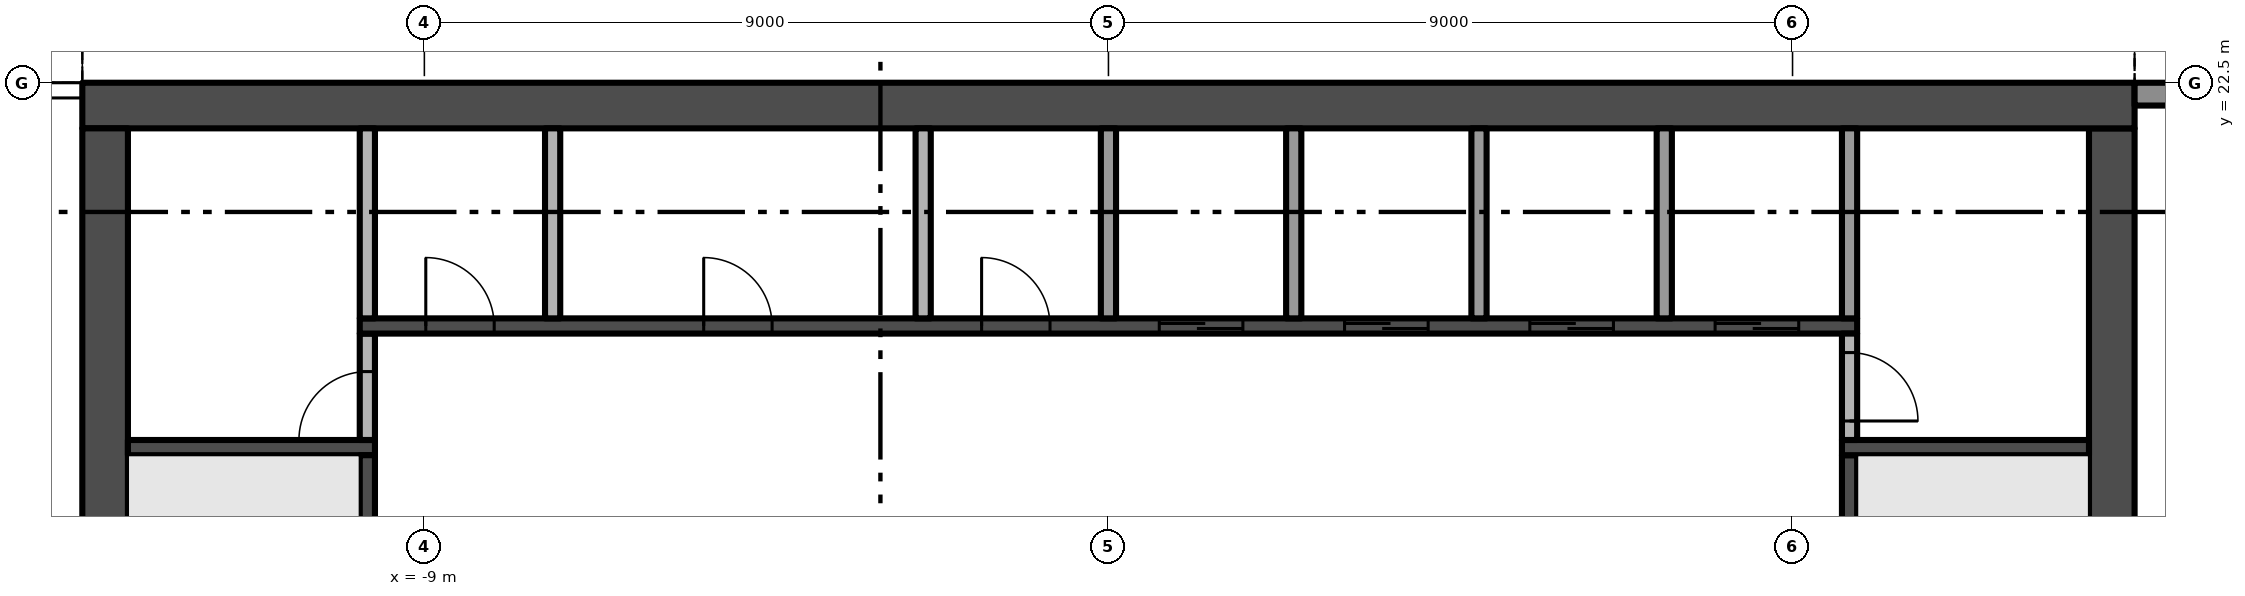
"""IFC4 building model, lengths in metres.
Left out: names, types, materials, properties, quantities, classifications, styles, units other than length and angle.
Written with IfcOpenShell. Run it as: python <this file> out.ifc"""

import sys

from ifc_helpers import new_model, si_unit, direction, frame, frame_2d, origin, place, context, subcontext, project, spatial, polyline, rectangle, outline, extrude, element, fill, save


model = new_model("IFC4")
c1 = context("Model", 3, precision=1e-05, world=origin(), true_north=direction((0.0, 1.0)))
c2 = subcontext(c1, "Body", "Model", "MODEL_VIEW")
j1 = project(units=[si_unit("LENGTHUNIT", "METRE"), si_unit("PLANEANGLEUNIT", "RADIAN")], contexts=[c1])
p1 = place(None, origin())
s1 = spatial("IfcSite", under=j1, at=p1, CompositionType="ELEMENT")
p2 = place(p1, origin())
s2 = spatial("IfcBuilding", under=s1, at=p2, CompositionType="ELEMENT")
p3 = place(p2, frame((0.0, 0.0, 233.8)))
s3 = spatial("IfcBuildingStorey", under=s2, at=p3, CompositionType="ELEMENT", Elevation=233.8)
p4 = place(p3, frame((13.2, 5.1, -0.3), z_axis=(0.0, 0.0, 1.0), x_axis=(0.0, 1.0, 0.0)))
e1 = element("IfcWall", 1, at=p4, inside=s3, PredefinedType="SHEAR", context=c2, shape_type="SweptSolid", body=[
    extrude(rectangle(XDim=16.8, YDim=0.6, at=frame_2d((8.4, 0.0))), origin(), (0.0, 0.0, 1.0), 5.0),
])
p5 = place(p4, frame((6.3, 0.0, 0.3)))
e2 = element("IfcOpeningElement", 2, at=p5, cuts=e1, PredefinedType="OPENING", context=c2, shape_type="SweptSolid", body=[
    extrude(rectangle(XDim=1.2, YDim=2.2, at=frame_2d((0.6, 1.1))), frame((0.0, 0.31, 0.0), z_axis=(0.0, -1.0, 0.0), x_axis=(1.0, 0.0, 0.0)), (0.0, 0.0, 1.0), 0.62),
])
p6 = place(p3, frame((13.5, 22.2, -0.3), z_axis=(0.0, 0.0, 1.0), x_axis=(-1.0, 0.0, 0.0)))
e3 = element("IfcWall", 3, at=p6, inside=s3, PredefinedType="SHEAR", context=c2, shape_type="SweptSolid", body=[
    extrude(rectangle(XDim=27.0, YDim=0.6, at=frame_2d((13.5, 0.0))), origin(), (0.0, 0.0, 1.0), 5.0),
])
p7 = place(p3, frame((-13.2, 21.9, -0.3), z_axis=(0.0, 0.0, 1.0), x_axis=(0.0, -1.0, 0.0)))
e4 = element("IfcWall", 4, at=p7, inside=s3, PredefinedType="SHEAR", context=c2, shape_type="SweptSolid", body=[
    extrude(rectangle(XDim=16.8, YDim=0.6, at=frame_2d((8.4, 0.0))), origin(), (0.0, 0.0, 1.0), 5.0),
])
p8 = place(p7, frame((9.3, 0.0, 0.3)))
e5 = element("IfcOpeningElement", 5, at=p8, cuts=e4, PredefinedType="OPENING", context=c2, shape_type="SweptSolid", body=[
    extrude(rectangle(XDim=1.2, YDim=2.2, at=frame_2d((0.6, 1.1))), frame((0.0, 0.31, 0.0), z_axis=(0.0, -1.0, 0.0), x_axis=(1.0, 0.0, 0.0)), (0.0, 0.0, 1.0), 0.62),
])
p9 = place(p3, frame((13.5, 22.35, 0.0), z_axis=(0.0, 0.0, 1.0), x_axis=(1.0, 0.0, 0.0)))
e6 = element("IfcWall", 6, at=p9, inside=s3, PredefinedType="SOLIDWALL", context=c2, shape_type="SweptSolid", body=[
    extrude(rectangle(XDim=4.025, YDim=0.3, at=frame_2d((2.013, 0.0))), origin(), (0.0, 0.0, 1.0), 4.7),
])
p10 = place(p9, frame((0.575, 0.0, 0.0)))
e7 = element("IfcOpeningElement", 7, at=p10, cuts=e6, PredefinedType="OPENING", context=c2, shape_type="SweptSolid", body=[
    extrude(rectangle(XDim=3.125, YDim=2.4, at=frame_2d((1.562, 1.2))), frame((0.0, 0.16, 0.0), z_axis=(0.0, -1.0, 0.0), x_axis=(1.0, 0.0, 0.0)), (0.0, 0.0, 1.0), 0.32),
])
p11 = place(p3, origin())
e8 = element("IfcWall", 8, at=p11, inside=s3, PredefinedType="USERDEFINED", context=c2, shape_type="SweptSolid", body=[
    extrude(outline(polyline([(22.5, 23.1), (21.0, 23.329), (19.5, 23.929), (18.0, 24.671), (16.5, 25.271), (15.0, 25.5), (13.5, 25.271), (13.538, 25.024), (15.0, 25.247), (16.434, 25.028), (17.898, 24.442), (19.398, 23.701), (20.934, 23.086), (22.462, 22.853), (22.5, 23.1)])), origin(), (0.0, 0.0, 1.0), 0.9),
])
p12 = place(p3, origin())
e9 = element("IfcWall", 9, at=p12, inside=s3, PredefinedType="USERDEFINED", context=c2, shape_type="SweptSolid", body=[
    extrude(outline(polyline([(-13.5, 23.1), (-15.0, 23.329), (-16.5, 23.929), (-18.0, 24.671), (-19.5, 25.271), (-21.0, 25.5), (-22.5, 25.271), (-22.462, 25.024), (-21.0, 25.247), (-19.566, 25.028), (-18.102, 24.442), (-16.602, 23.701), (-15.066, 23.086), (-13.538, 22.853), (-13.5, 23.1)])), origin(), (0.0, 0.0, 1.0), 0.9),
])
p13 = place(p3, frame((-12.9, 17.7, 0.0), z_axis=(0.0, 0.0, 1.0), x_axis=(1.0, 0.0, 0.0)))
e10 = element("IfcWall", 10, at=p13, inside=s3, PredefinedType="SHEAR", context=c2, shape_type="SweptSolid", body=[
    extrude(rectangle(XDim=3.25, YDim=0.2, at=frame_2d((1.625, 0.0))), origin(), (0.0, 0.0, 1.0), 4.7),
])
p14 = place(p3, frame((-9.75, 16.1, 0.0), z_axis=(0.0, 0.0, 1.0), x_axis=(0.0, 1.0, 0.0)))
e11 = element("IfcWall", 11, at=p14, inside=s3, PredefinedType="SHEAR", context=c2, shape_type="SweptSolid", body=[
    extrude(rectangle(XDim=1.5, YDim=0.2, at=frame_2d((0.75, 0.0))), origin(), (0.0, 0.0, 1.0), 4.7),
])
p15 = place(p3, frame((-9.75, 17.8, 0.0), z_axis=(0.0, 0.0, 1.0), x_axis=(0.0, 1.0, 0.0)))
e12 = element("IfcWall", 12, at=p15, inside=s3, PredefinedType="PARTITIONING", context=c2, shape_type="SweptSolid", body=[
    extrude(rectangle(XDim=1.4, YDim=0.2, at=frame_2d((0.7, 0.0))), origin(), (0.0, 0.0, 1.0), 4.7),
])
p16 = place(p15, origin())
e13 = element("IfcOpeningElement", 13, at=p16, cuts=e12, PredefinedType="OPENING", context=c2, shape_type="SweptSolid", body=[
    extrude(rectangle(XDim=0.9, YDim=2.1, at=frame_2d((0.45, 1.05))), frame((0.0, 0.11, 0.0), z_axis=(0.0, -1.0, 0.0), x_axis=(1.0, 0.0, 0.0)), (0.0, 0.0, 1.0), 0.22),
])
p17 = place(p3, frame((-9.85, 19.3, 0.0), z_axis=(0.0, 0.0, 1.0), x_axis=(1.0, 0.0, 0.0)))
e14 = element("IfcWall", 14, at=p17, inside=s3, PredefinedType="SHEAR", context=c2, shape_type="SweptSolid", body=[
    extrude(rectangle(XDim=19.7, YDim=0.2, at=frame_2d((9.85, 0.0))), origin(), (0.0, 0.0, 1.0), 4.7),
])
p18 = place(p17, frame((10.519, 0.0, 0.0)))
e15 = element("IfcOpeningElement", 15, at=p18, cuts=e14, PredefinedType="OPENING", context=c2, shape_type="SweptSolid", body=[
    extrude(rectangle(XDim=1.1, YDim=2.1, at=frame_2d((0.55, 1.05))), frame((0.0, 0.11, 0.0), z_axis=(0.0, -1.0, 0.0), x_axis=(1.0, 0.0, 0.0)), (0.0, 0.0, 1.0), 0.22),
])
p19 = place(p17, frame((12.956, 0.0, 0.0)))
e16 = element("IfcOpeningElement", 16, at=p19, cuts=e14, PredefinedType="OPENING", context=c2, shape_type="SweptSolid", body=[
    extrude(rectangle(XDim=1.1, YDim=2.1, at=frame_2d((0.55, 1.05))), frame((0.0, 0.11, 0.0), z_axis=(0.0, -1.0, 0.0), x_axis=(1.0, 0.0, 0.0)), (0.0, 0.0, 1.0), 0.22),
])
p20 = place(p17, frame((15.394, 0.0, 0.0)))
e17 = element("IfcOpeningElement", 17, at=p20, cuts=e14, PredefinedType="OPENING", context=c2, shape_type="SweptSolid", body=[
    extrude(rectangle(XDim=1.1, YDim=2.1, at=frame_2d((0.55, 1.05))), frame((0.0, 0.11, 0.0), z_axis=(0.0, -1.0, 0.0), x_axis=(1.0, 0.0, 0.0)), (0.0, 0.0, 1.0), 0.22),
])
p21 = place(p17, frame((17.831, 0.0, 0.0)))
e18 = element("IfcOpeningElement", 18, at=p21, cuts=e14, PredefinedType="OPENING", context=c2, shape_type="SweptSolid", body=[
    extrude(rectangle(XDim=1.1, YDim=2.1, at=frame_2d((0.55, 1.05))), frame((0.0, 0.11, 0.0), z_axis=(0.0, -1.0, 0.0), x_axis=(1.0, 0.0, 0.0)), (0.0, 0.0, 1.0), 0.22),
])
p22 = place(p17, frame((0.869, 0.0, 0.0)))
e19 = element("IfcOpeningElement", 19, at=p22, cuts=e14, PredefinedType="OPENING", context=c2, shape_type="SweptSolid", body=[
    extrude(rectangle(XDim=0.9, YDim=2.1, at=frame_2d((0.45, 1.05))), frame((0.0, 0.11, 0.0), z_axis=(0.0, -1.0, 0.0), x_axis=(1.0, 0.0, 0.0)), (0.0, 0.0, 1.0), 0.22),
])
p23 = place(p17, frame((4.525, 0.0, 0.0)))
e20 = element("IfcOpeningElement", 20, at=p23, cuts=e14, PredefinedType="OPENING", context=c2, shape_type="SweptSolid", body=[
    extrude(rectangle(XDim=0.9, YDim=2.1, at=frame_2d((0.45, 1.05))), frame((0.0, 0.11, 0.0), z_axis=(0.0, -1.0, 0.0), x_axis=(1.0, 0.0, 0.0)), (0.0, 0.0, 1.0), 0.22),
])
p24 = place(p17, frame((8.181, 0.0, 0.0)))
e21 = element("IfcOpeningElement", 21, at=p24, cuts=e14, PredefinedType="OPENING", context=c2, shape_type="SweptSolid", body=[
    extrude(rectangle(XDim=0.9, YDim=2.1, at=frame_2d((0.45, 1.05))), frame((0.0, 0.11, 0.0), z_axis=(0.0, -1.0, 0.0), x_axis=(1.0, 0.0, 0.0)), (0.0, 0.0, 1.0), 0.22),
])
for number, where, z_axis, x_axis in (
    (22, (-9.75, 19.4, 0.0), (0.0, 0.0, 1.0), (0.0, 1.0, 0.0)),
    (23, (-7.312, 19.4, 0.0), (0.0, 0.0, 1.0), (0.0, 1.0, 0.0)),
    (24, (-2.438, 19.4, 0.0), (0.0, 0.0, 1.0), (0.0, 1.0, 0.0)),
    (25, (0.0, 19.4, 0.0), (0.0, 0.0, 1.0), (0.0, 1.0, 0.0)),
    (26, (2.438, 19.4, 0.0), (0.0, 0.0, 1.0), (0.0, 1.0, 0.0)),
    (27, (4.875, 19.4, 0.0), (0.0, 0.0, 1.0), (0.0, 1.0, 0.0)),
    (28, (7.312, 19.4, 0.0), (0.0, 0.0, 1.0), (0.0, 1.0, 0.0)),
):
    element("IfcWall", number, at=place(p3, frame(where, z_axis=z_axis, x_axis=x_axis)), inside=s3, PredefinedType="PARTITIONING", context=c2, shape_type="SweptSolid", body=[
        extrude(rectangle(XDim=2.5, YDim=0.2, at=frame_2d((1.25, 0.0))), origin(), (0.0, 0.0, 1.0), 4.7),
    ])
p25 = place(p3, frame((9.75, 16.1, 0.0), z_axis=(0.0, 0.0, 1.0), x_axis=(0.0, 1.0, 0.0)))
e29 = element("IfcWall", 29, at=p25, inside=s3, PredefinedType="SHEAR", context=c2, shape_type="SweptSolid", body=[
    extrude(rectangle(XDim=1.5, YDim=0.2, at=frame_2d((0.75, 0.0))), origin(), (0.0, 0.0, 1.0), 4.7),
])
p26 = place(p3, frame((9.65, 17.7, 0.0), z_axis=(0.0, 0.0, 1.0), x_axis=(1.0, 0.0, 0.0)))
e30 = element("IfcWall", 30, at=p26, inside=s3, PredefinedType="SHEAR", context=c2, shape_type="SweptSolid", body=[
    extrude(rectangle(XDim=3.25, YDim=0.2, at=frame_2d((1.625, 0.0))), origin(), (0.0, 0.0, 1.0), 4.7),
])
p27 = place(p3, frame((9.75, 19.2, 0.0), z_axis=(0.0, 0.0, 1.0), x_axis=(0.0, -1.0, 0.0)))
e31 = element("IfcWall", 31, at=p27, inside=s3, PredefinedType="PARTITIONING", context=c2, shape_type="SweptSolid", body=[
    extrude(rectangle(XDim=1.4, YDim=0.2, at=frame_2d((0.7, 0.0))), origin(), (0.0, 0.0, 1.0), 4.7),
])
p28 = place(p27, frame((0.25, 0.0, 0.0)))
e32 = element("IfcOpeningElement", 32, at=p28, cuts=e31, PredefinedType="OPENING", context=c2, shape_type="SweptSolid", body=[
    extrude(rectangle(XDim=0.9, YDim=2.1, at=frame_2d((0.45, 1.05))), frame((0.0, 0.11, 0.0), z_axis=(0.0, -1.0, 0.0), x_axis=(1.0, 0.0, 0.0)), (0.0, 0.0, 1.0), 0.22),
])
p29 = place(p3, frame((9.75, 19.4, 0.0), z_axis=(0.0, 0.0, 1.0), x_axis=(0.0, 1.0, 0.0)))
e33 = element("IfcWall", 33, at=p29, inside=s3, PredefinedType="PARTITIONING", context=c2, shape_type="SweptSolid", body=[
    extrude(rectangle(XDim=2.5, YDim=0.2, at=frame_2d((1.25, 0.0))), origin(), (0.0, 0.0, 1.0), 4.7),
])
p30 = place(p18, origin())
e34 = element("IfcDoor", 34, at=p30, inside=s3, OperationType="SLIDING_TO_RIGHT", PredefinedType="DOOR", context=c2, shape_type="SweptSolid", body=[
    extrude(rectangle(XDim=1.1, YDim=2.1, at=frame_2d((0.55, 1.05))), frame((0.0, 0.025, 0.0), z_axis=(0.0, -1.0, 0.0), x_axis=(1.0, 0.0, 0.0)), (0.0, 0.0, 1.0), 0.05),
])
fill(e15, e34)
p31 = place(p19, origin())
e35 = element("IfcDoor", 35, at=p31, inside=s3, OperationType="SLIDING_TO_RIGHT", PredefinedType="DOOR", context=c2, shape_type="SweptSolid", body=[
    extrude(rectangle(XDim=1.1, YDim=2.1, at=frame_2d((0.55, 1.05))), frame((0.0, 0.025, 0.0), z_axis=(0.0, -1.0, 0.0), x_axis=(1.0, 0.0, 0.0)), (0.0, 0.0, 1.0), 0.05),
])
fill(e16, e35)
p32 = place(p20, origin())
e36 = element("IfcDoor", 36, at=p32, inside=s3, OperationType="SLIDING_TO_RIGHT", PredefinedType="DOOR", context=c2, shape_type="SweptSolid", body=[
    extrude(rectangle(XDim=1.1, YDim=2.1, at=frame_2d((0.55, 1.05))), frame((0.0, 0.025, 0.0), z_axis=(0.0, -1.0, 0.0), x_axis=(1.0, 0.0, 0.0)), (0.0, 0.0, 1.0), 0.05),
])
fill(e17, e36)
p33 = place(p21, origin())
e37 = element("IfcDoor", 37, at=p33, inside=s3, OperationType="SLIDING_TO_RIGHT", PredefinedType="DOOR", context=c2, shape_type="SweptSolid", body=[
    extrude(rectangle(XDim=1.1, YDim=2.1, at=frame_2d((0.55, 1.05))), frame((0.0, 0.025, 0.0), z_axis=(0.0, -1.0, 0.0), x_axis=(1.0, 0.0, 0.0)), (0.0, 0.0, 1.0), 0.05),
])
fill(e18, e37)
p34 = place(p16, origin())
e38 = element("IfcDoor", 38, at=p34, inside=s3, OperationType="SINGLE_SWING_LEFT", PredefinedType="DOOR", context=c2, shape_type="SweptSolid", body=[
    extrude(rectangle(XDim=0.9, YDim=2.1, at=frame_2d((0.45, 1.05))), frame((0.0, 0.025, 0.0), z_axis=(0.0, -1.0, 0.0), x_axis=(1.0, 0.0, 0.0)), (0.0, 0.0, 1.0), 0.05),
])
fill(e13, e38)
p35 = place(p28, origin())
e39 = element("IfcDoor", 39, at=p35, inside=s3, OperationType="SINGLE_SWING_RIGHT", PredefinedType="DOOR", context=c2, shape_type="SweptSolid", body=[
    extrude(rectangle(XDim=0.9, YDim=2.1, at=frame_2d((0.45, 1.05))), frame((0.0, 0.025, 0.0), z_axis=(0.0, -1.0, 0.0), x_axis=(1.0, 0.0, 0.0)), (0.0, 0.0, 1.0), 0.05),
])
fill(e32, e39)
p36 = place(p22, origin())
e40 = element("IfcDoor", 40, at=p36, inside=s3, OperationType="SINGLE_SWING_LEFT", PredefinedType="DOOR", context=c2, shape_type="SweptSolid", body=[
    extrude(rectangle(XDim=0.9, YDim=2.1, at=frame_2d((0.45, 1.05))), frame((0.0, 0.025, 0.0), z_axis=(0.0, -1.0, 0.0), x_axis=(1.0, 0.0, 0.0)), (0.0, 0.0, 1.0), 0.05),
])
fill(e19, e40)
p37 = place(p23, origin())
e41 = element("IfcDoor", 41, at=p37, inside=s3, OperationType="SINGLE_SWING_LEFT", PredefinedType="DOOR", context=c2, shape_type="SweptSolid", body=[
    extrude(rectangle(XDim=0.9, YDim=2.1, at=frame_2d((0.45, 1.05))), frame((0.0, 0.025, 0.0), z_axis=(0.0, -1.0, 0.0), x_axis=(1.0, 0.0, 0.0)), (0.0, 0.0, 1.0), 0.05),
])
fill(e20, e41)
p38 = place(p24, origin())
e42 = element("IfcDoor", 42, at=p38, inside=s3, OperationType="SINGLE_SWING_LEFT", PredefinedType="DOOR", context=c2, shape_type="SweptSolid", body=[
    extrude(rectangle(XDim=0.9, YDim=2.1, at=frame_2d((0.45, 1.05))), frame((0.0, 0.025, 0.0), z_axis=(0.0, -1.0, 0.0), x_axis=(1.0, 0.0, 0.0)), (0.0, 0.0, 1.0), 0.05),
])
fill(e21, e42)
save(model, sys.argv[1])
